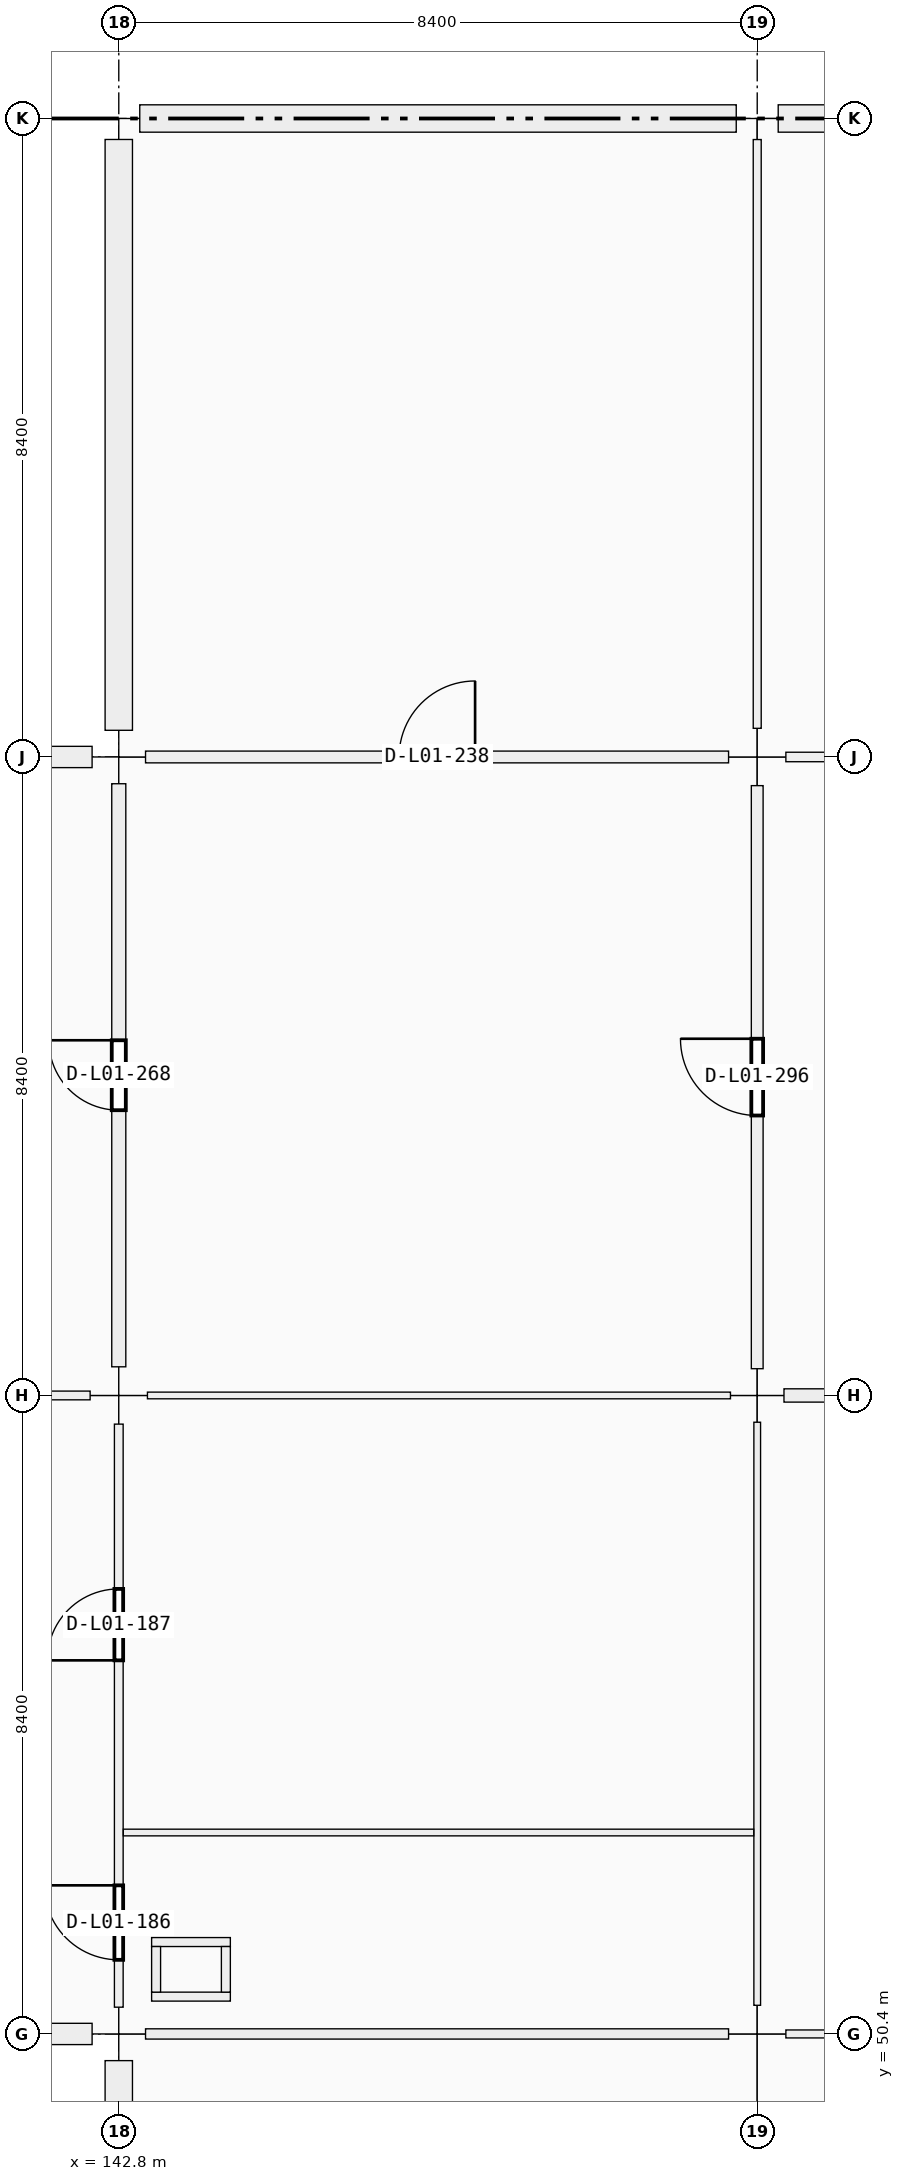
"""IFC4 building model, lengths in metres.
Left out: names, types, materials, properties, quantities, classifications, styles, units other than length and angle.
Written with IfcOpenShell. Run it as: python <this file> out.ifc"""

import sys

from ifc_helpers import new_model, si_unit, direction, frame, frame_2d, origin, origin_2d, place, context, subcontext, project, spatial, rectangle, extrude, element, fill, save


model = new_model("IFC4")
c1 = context("Model", 3, precision=1e-05, world=origin(), true_north=direction((0.0, 1.0)))
c2 = subcontext(c1, "Body", "Model", "MODEL_VIEW")
j1 = project(units=[si_unit("LENGTHUNIT", "METRE"), si_unit("PLANEANGLEUNIT", "RADIAN")], contexts=[c1])
p1 = place(None, origin())
s1 = spatial("IfcSite", under=j1, at=p1, CompositionType="ELEMENT")
p2 = place(p1, origin())
s2 = spatial("IfcBuilding", under=s1, at=p2, CompositionType="ELEMENT")
p3 = place(p2, frame((0.0, 0.0, 5.76)))
s3 = spatial("IfcBuildingStorey", under=s2, at=p3, CompositionType="ELEMENT", Elevation=5.76)
p4 = place(p3, frame((142.8, 50.4, 0.0), z_axis=(0.0, 0.0, 1.0), x_axis=(1.0, 0.0, 0.0)))
e1 = element("IfcColumn", 1, at=p4, inside=s3, PredefinedType="COLUMN", context=c2, shape_type="SweptSolid", body=[
    extrude(rectangle(XDim=0.7, YDim=0.7, at=origin_2d()), origin(), (0.0, 0.0, 1.0), 4.5),
])
p5 = place(p3, frame((142.8, 58.8, 0.0), z_axis=(0.0, 0.0, 1.0), x_axis=(1.0, 0.0, 0.0)))
e2 = element("IfcColumn", 2, at=p5, inside=s3, PredefinedType="COLUMN", context=c2, shape_type="SweptSolid", body=[
    extrude(rectangle(XDim=0.75, YDim=0.75, at=origin_2d()), origin(), (0.0, 0.0, 1.0), 4.5),
])
p6 = place(p3, frame((142.8, 67.2, 0.0), z_axis=(0.0, 0.0, 1.0), x_axis=(1.0, 0.0, 0.0)))
e3 = element("IfcColumn", 3, at=p6, inside=s3, PredefinedType="COLUMN", context=c2, shape_type="SweptSolid", body=[
    extrude(rectangle(XDim=0.7, YDim=0.7, at=origin_2d()), origin(), (0.0, 0.0, 1.0), 4.5),
])
p7 = place(p3, frame((142.8, 75.6, 0.0), z_axis=(0.0, 0.0, 1.0), x_axis=(1.0, 0.0, 0.0)))
e4 = element("IfcColumn", 4, at=p7, inside=s3, PredefinedType="COLUMN", context=c2, shape_type="SweptSolid", body=[
    extrude(rectangle(XDim=0.55, YDim=0.55, at=origin_2d()), origin(), (0.0, 0.0, 1.0), 4.2),
])
p8 = place(p3, frame((151.2, 50.4, 0.0), z_axis=(0.0, 0.0, 1.0), x_axis=(1.0, 0.0, 0.0)))
e5 = element("IfcColumn", 5, at=p8, inside=s3, PredefinedType="COLUMN", context=c2, shape_type="SweptSolid", body=[
    extrude(rectangle(XDim=0.75, YDim=0.75, at=origin_2d()), origin(), (0.0, 0.0, 1.0), 4.5),
])
p9 = place(p3, frame((151.2, 58.8, 0.0), z_axis=(0.0, 0.0, 1.0), x_axis=(1.0, 0.0, 0.0)))
e6 = element("IfcColumn", 6, at=p9, inside=s3, PredefinedType="COLUMN", context=c2, shape_type="SweptSolid", body=[
    extrude(rectangle(XDim=0.7, YDim=0.7, at=origin_2d()), origin(), (0.0, 0.0, 1.0), 4.5),
])
p10 = place(p3, frame((151.2, 67.2, 0.0), z_axis=(0.0, 0.0, 1.0), x_axis=(1.0, 0.0, 0.0)))
e7 = element("IfcColumn", 7, at=p10, inside=s3, PredefinedType="COLUMN", context=c2, shape_type="SweptSolid", body=[
    extrude(rectangle(XDim=0.75, YDim=0.75, at=origin_2d()), origin(), (0.0, 0.0, 1.0), 4.5),
])
p11 = place(p3, frame((151.2, 75.6, 0.0), z_axis=(0.0, 0.0, 1.0), x_axis=(1.0, 0.0, 0.0)))
e8 = element("IfcColumn", 8, at=p11, inside=s3, PredefinedType="COLUMN", context=c2, shape_type="SweptSolid", body=[
    extrude(rectangle(XDim=0.55, YDim=0.55, at=origin_2d()), origin(), (0.0, 0.0, 1.0), 4.2),
])
p12 = place(p3, frame((142.449, 50.4, 0.0), z_axis=(0.0, 0.0, 1.0), x_axis=(-1.0, 0.0, 0.0)))
e9 = element("IfcWall", 9, at=p12, inside=s3, PredefinedType="SOLIDWALL", context=c2, shape_type="SweptSolid", body=[
    extrude(rectangle(XDim=7.673, YDim=0.28, at=frame_2d((3.836, 0.0))), origin(), (0.0, 0.0, 1.0), 3.4),
])
p13 = place(p3, frame((134.726, 67.2, 0.0), z_axis=(0.0, 0.0, 1.0), x_axis=(1.0, 0.0, 0.0)))
e10 = element("IfcWall", 10, at=p13, inside=s3, PredefinedType="SOLIDWALL", context=c2, shape_type="SweptSolid", body=[
    extrude(rectangle(XDim=7.723, YDim=0.28, at=frame_2d((3.861, 0.0))), origin(), (0.0, 0.0, 1.0), 3.4),
])
p14 = place(p13, frame((2.662, 0.0, 0.9)))
e11 = element("IfcOpeningElement", 11, at=p14, cuts=e10, PredefinedType="OPENING", context=c2, shape_type="SweptSolid", body=[
    extrude(rectangle(XDim=2.4, YDim=2.25, at=frame_2d((1.2, 1.125))), frame((0.0, 0.14, 0.0), z_axis=(0.0, -1.0, 0.0), x_axis=(1.0, 0.0, 0.0)), (0.0, 0.0, 1.0), 0.28),
])
p15 = place(p3, frame((142.8, 42.376, 0.0), z_axis=(0.0, 0.0, 1.0), x_axis=(0.0, 1.0, 0.0)))
e12 = element("IfcWall", 12, at=p15, inside=s3, PredefinedType="SOLIDWALL", context=c2, shape_type="SweptSolid", body=[
    extrude(rectangle(XDim=7.673, YDim=0.36, at=frame_2d((3.836, 0.0))), origin(), (0.0, 0.0, 1.0), 3.4),
])
p16 = place(p15, frame((3.386, 0.0, 0.9)))
e13 = element("IfcOpeningElement", 13, at=p16, cuts=e12, PredefinedType="OPENING", context=c2, shape_type="SweptSolid", body=[
    extrude(rectangle(XDim=0.9, YDim=1.5, at=frame_2d((0.45, 0.75))), frame((0.0, 0.18, 0.0), z_axis=(0.0, -1.0, 0.0), x_axis=(1.0, 0.0, 0.0)), (0.0, 0.0, 1.0), 0.36),
])
p17 = place(p3, frame((142.8, 67.551, 0.0), z_axis=(0.0, 0.0, 1.0), x_axis=(0.0, 1.0, 0.0)))
e14 = element("IfcWall", 14, at=p17, inside=s3, PredefinedType="SOLIDWALL", context=c2, shape_type="SweptSolid", body=[
    extrude(rectangle(XDim=7.773, YDim=0.36, at=frame_2d((3.886, 0.0))), origin(), (0.0, 0.0, 1.0), 3.4),
])
p18 = place(p17, frame((3.036, 0.0, 0.9)))
e15 = element("IfcOpeningElement", 15, at=p18, cuts=e14, PredefinedType="OPENING", context=c2, shape_type="SweptSolid", body=[
    extrude(rectangle(XDim=1.7, YDim=1.85, at=frame_2d((0.85, 0.925))), frame((0.0, 0.18, 0.0), z_axis=(0.0, -1.0, 0.0), x_axis=(1.0, 0.0, 0.0)), (0.0, 0.0, 1.0), 0.36),
])
p19 = place(p3, frame((143.076, 75.6, 0.0), z_axis=(0.0, 0.0, 1.0), x_axis=(1.0, 0.0, 0.0)))
e16 = element("IfcWall", 16, at=p19, inside=s3, PredefinedType="SOLIDWALL", context=c2, shape_type="SweptSolid", body=[
    extrude(rectangle(XDim=7.848, YDim=0.36, at=frame_2d((3.924, 0.0))), origin(), (0.0, 0.0, 1.0), 3.4),
])
p20 = place(p19, frame((2.774, 0.0, 0.9)))
e17 = element("IfcOpeningElement", 17, at=p20, cuts=e16, PredefinedType="OPENING", context=c2, shape_type="SweptSolid", body=[
    extrude(rectangle(XDim=2.3, YDim=1.85, at=frame_2d((1.15, 0.925))), frame((0.0, 0.18, 0.0), z_axis=(0.0, -1.0, 0.0), x_axis=(1.0, 0.0, 0.0)), (0.0, 0.0, 1.0), 0.36),
])
p21 = place(p3, frame((151.476, 75.6, 0.0), z_axis=(0.0, 0.0, 1.0), x_axis=(1.0, 0.0, 0.0)))
e18 = element("IfcWall", 18, at=p21, inside=s3, PredefinedType="SOLIDWALL", context=c2, shape_type="SweptSolid", body=[
    extrude(rectangle(XDim=7.848, YDim=0.36, at=frame_2d((3.924, 0.0))), origin(), (0.0, 0.0, 1.0), 3.4),
])
p22 = place(p21, frame((2.474, 0.0, 0.9)))
e19 = element("IfcOpeningElement", 19, at=p22, cuts=e18, PredefinedType="OPENING", context=c2, shape_type="SweptSolid", body=[
    extrude(rectangle(XDim=2.9, YDim=1.85, at=frame_2d((1.45, 0.925))), frame((0.0, 0.18, 0.0), z_axis=(0.0, -1.0, 0.0), x_axis=(1.0, 0.0, 0.0)), (0.0, 0.0, 1.0), 0.36),
])
for number, where, z_axis, x_axis in (
    (20, (143.232, 50.891, 0.0), (0.0, 0.0, 1.0), (1.0, 0.0, 0.0)),
    (21, (143.232, 51.609, 0.0), (0.0, 0.0, 1.0), (1.0, 0.0, 0.0)),
):
    element("IfcWall", number, at=place(p3, frame(where, z_axis=z_axis, x_axis=x_axis)), inside=s3, PredefinedType="PARTITIONING", context=c2, shape_type="SweptSolid", body=[
        extrude(rectangle(XDim=1.036, YDim=0.118, at=frame_2d((0.518, 0.0))), origin(), (0.0, 0.0, 1.0), 3.48),
    ])
for number, where, z_axis, x_axis in (
    (22, (143.291, 50.95, 0.0), (0.0, 0.0, 1.0), (0.0, 1.0, 0.0)),
    (23, (144.209, 50.95, 0.0), (0.0, 0.0, 1.0), (0.0, 1.0, 0.0)),
):
    element("IfcWall", number, at=place(p3, frame(where, z_axis=z_axis, x_axis=x_axis)), inside=s3, PredefinedType="PARTITIONING", context=c2, shape_type="SweptSolid", body=[
        extrude(rectangle(XDim=0.6, YDim=0.118, at=frame_2d((0.3, 0.0))), origin(), (0.0, 0.0, 1.0), 3.48),
    ])
p23 = place(p3, frame((134.752, 58.8, 0.0), z_axis=(0.0, 0.0, 1.0), x_axis=(1.0, 0.0, 0.0)))
e24 = element("IfcWall", 24, at=p23, inside=s3, PredefinedType="PARTITIONING", context=c2, shape_type="SweptSolid", body=[
    extrude(rectangle(XDim=7.671, YDim=0.115, at=frame_2d((3.835, 0.0))), origin(), (0.0, 0.0, 1.0), 2.4),
])
p24 = place(p23, frame((3.356, 0.0, 0.0)))
e25 = element("IfcOpeningElement", 25, at=p24, cuts=e24, PredefinedType="OPENING", context=c2, shape_type="SweptSolid", body=[
    extrude(rectangle(XDim=0.96, YDim=2.18, at=frame_2d((0.48, 1.09))), frame((0.0, 0.058, 0.0), z_axis=(0.0, -1.0, 0.0), x_axis=(1.0, 0.0, 0.0)), (0.0, 0.0, 1.0), 0.115),
])
p25 = place(p3, frame((143.152, 50.4, 0.0), z_axis=(0.0, 0.0, 1.0), x_axis=(1.0, 0.0, 0.0)))
e26 = element("IfcWall", 26, at=p25, inside=s3, PredefinedType="PARTITIONING", context=c2, shape_type="SweptSolid", body=[
    extrude(rectangle(XDim=7.671, YDim=0.135, at=frame_2d((3.835, 0.0))), origin(), (0.0, 0.0, 1.0), 2.4),
])
p26 = place(p3, frame((143.177, 58.8, 0.0), z_axis=(0.0, 0.0, 1.0), x_axis=(1.0, 0.0, 0.0)))
e27 = element("IfcWall", 27, at=p26, inside=s3, PredefinedType="PARTITIONING", context=c2, shape_type="SweptSolid", body=[
    extrude(rectangle(XDim=7.671, YDim=0.088, at=frame_2d((3.835, 0.0))), origin(), (0.0, 0.0, 1.0), 2.4),
])
p27 = place(p3, frame((143.152, 67.2, 0.0), z_axis=(0.0, 0.0, 1.0), x_axis=(1.0, 0.0, 0.0)))
e28 = element("IfcWall", 28, at=p27, inside=s3, PredefinedType="PARTITIONING", context=c2, shape_type="SweptSolid", body=[
    extrude(rectangle(XDim=7.671, YDim=0.155, at=frame_2d((3.835, 0.0))), origin(), (0.0, 0.0, 1.0), 2.4),
])
p28 = place(p27, frame((3.336, 0.0, 0.0)))
e29 = element("IfcOpeningElement", 29, at=p28, cuts=e28, PredefinedType="OPENING", context=c2, shape_type="SweptSolid", body=[
    extrude(rectangle(XDim=1.0, YDim=2.2, at=frame_2d((0.5, 1.1))), frame((0.0, 0.078, 0.0), z_axis=(0.0, -1.0, 0.0), x_axis=(1.0, 0.0, 0.0)), (0.0, 0.0, 1.0), 0.155),
])
p29 = place(p3, frame((151.577, 50.4, 0.0), z_axis=(0.0, 0.0, 1.0), x_axis=(1.0, 0.0, 0.0)))
e30 = element("IfcWall", 30, at=p29, inside=s3, PredefinedType="PARTITIONING", context=c2, shape_type="SweptSolid", body=[
    extrude(rectangle(XDim=7.671, YDim=0.105, at=frame_2d((3.835, 0.0))), origin(), (0.0, 0.0, 1.0), 2.4),
])
p30 = place(p29, frame((3.365, 0.0, 0.0)))
e31 = element("IfcOpeningElement", 31, at=p30, cuts=e30, PredefinedType="OPENING", context=c2, shape_type="SweptSolid", body=[
    extrude(rectangle(XDim=0.94, YDim=2.15, at=frame_2d((0.47, 1.075))), frame((0.0, 0.052, 0.0), z_axis=(0.0, -1.0, 0.0), x_axis=(1.0, 0.0, 0.0)), (0.0, 0.0, 1.0), 0.105),
])
p31 = place(p3, frame((151.552, 58.8, 0.0), z_axis=(0.0, 0.0, 1.0), x_axis=(1.0, 0.0, 0.0)))
e32 = element("IfcWall", 32, at=p31, inside=s3, PredefinedType="PARTITIONING", context=c2, shape_type="SweptSolid", body=[
    extrude(rectangle(XDim=7.671, YDim=0.175, at=frame_2d((3.835, 0.0))), origin(), (0.0, 0.0, 1.0), 2.4),
])
p32 = place(p31, frame((3.376, 0.0, 0.0)))
e33 = element("IfcOpeningElement", 33, at=p32, cuts=e32, PredefinedType="OPENING", context=c2, shape_type="SweptSolid", body=[
    extrude(rectangle(XDim=0.92, YDim=2.15, at=frame_2d((0.46, 1.075))), frame((0.0, 0.087, 0.0), z_axis=(0.0, -1.0, 0.0), x_axis=(1.0, 0.0, 0.0)), (0.0, 0.0, 1.0), 0.175),
])
p33 = place(p3, frame((151.577, 67.2, 0.0), z_axis=(0.0, 0.0, 1.0), x_axis=(1.0, 0.0, 0.0)))
e34 = element("IfcWall", 34, at=p33, inside=s3, PredefinedType="PARTITIONING", context=c2, shape_type="SweptSolid", body=[
    extrude(rectangle(XDim=7.671, YDim=0.125, at=frame_2d((3.835, 0.0))), origin(), (0.0, 0.0, 1.0), 2.4),
])
p34 = place(p33, frame((3.311, 0.0, 0.0)))
e35 = element("IfcOpeningElement", 35, at=p34, cuts=e34, PredefinedType="OPENING", context=c2, shape_type="SweptSolid", body=[
    extrude(rectangle(XDim=1.05, YDim=2.12, at=frame_2d((0.525, 1.06))), frame((0.0, 0.062, 0.0), z_axis=(0.0, -1.0, 0.0), x_axis=(1.0, 0.0, 0.0)), (0.0, 0.0, 1.0), 0.125),
])
p35 = place(p3, frame((142.8, 50.752, 0.0), z_axis=(0.0, 0.0, 1.0), x_axis=(0.0, 1.0, 0.0)))
e36 = element("IfcWall", 36, at=p35, inside=s3, PredefinedType="PARTITIONING", context=c2, shape_type="SweptSolid", body=[
    extrude(rectangle(XDim=7.671, YDim=0.115, at=frame_2d((3.835, 0.0))), origin(), (0.0, 0.0, 1.0), 2.4),
])
p36 = place(p35, frame((0.623, 0.0, 0.0)))
e37 = element("IfcOpeningElement", 37, at=p36, cuts=e36, PredefinedType="OPENING", context=c2, shape_type="SweptSolid", body=[
    extrude(rectangle(XDim=0.98, YDim=2.08, at=frame_2d((0.49, 1.04))), frame((0.0, 0.058, 0.0), z_axis=(0.0, -1.0, 0.0), x_axis=(1.0, 0.0, 0.0)), (0.0, 0.0, 1.0), 0.115),
])
p37 = place(p35, frame((4.563, 0.0, 0.0)))
e38 = element("IfcOpeningElement", 38, at=p37, cuts=e36, PredefinedType="OPENING", context=c2, shape_type="SweptSolid", body=[
    extrude(rectangle(XDim=0.94, YDim=2.08, at=frame_2d((0.47, 1.04))), frame((0.0, 0.058, 0.0), z_axis=(0.0, -1.0, 0.0), x_axis=(1.0, 0.0, 0.0)), (0.0, 0.0, 1.0), 0.115),
])
p38 = place(p3, frame((142.8, 59.177, 0.0), z_axis=(0.0, 0.0, 1.0), x_axis=(0.0, 1.0, 0.0)))
e39 = element("IfcWall", 39, at=p38, inside=s3, PredefinedType="PARTITIONING", context=c2, shape_type="SweptSolid", body=[
    extrude(rectangle(XDim=7.671, YDim=0.185, at=frame_2d((3.835, 0.0))), origin(), (0.0, 0.0, 1.0), 2.4),
])
p39 = place(p38, frame((3.376, 0.0, 0.0)))
e40 = element("IfcOpeningElement", 40, at=p39, cuts=e39, PredefinedType="OPENING", context=c2, shape_type="SweptSolid", body=[
    extrude(rectangle(XDim=0.92, YDim=2.15, at=frame_2d((0.46, 1.075))), frame((0.0, 0.093, 0.0), z_axis=(0.0, -1.0, 0.0), x_axis=(1.0, 0.0, 0.0)), (0.0, 0.0, 1.0), 0.185),
])
p40 = place(p3, frame((151.2, 50.777, 0.0), z_axis=(0.0, 0.0, 1.0), x_axis=(0.0, 1.0, 0.0)))
e41 = element("IfcWall", 41, at=p40, inside=s3, PredefinedType="PARTITIONING", context=c2, shape_type="SweptSolid", body=[
    extrude(rectangle(XDim=7.671, YDim=0.088, at=frame_2d((3.835, 0.0))), origin(), (0.0, 0.0, 1.0), 2.4),
])
p41 = place(p3, frame((151.2, 59.152, 0.0), z_axis=(0.0, 0.0, 1.0), x_axis=(0.0, 1.0, 0.0)))
e42 = element("IfcWall", 42, at=p41, inside=s3, PredefinedType="PARTITIONING", context=c2, shape_type="SweptSolid", body=[
    extrude(rectangle(XDim=7.671, YDim=0.155, at=frame_2d((3.835, 0.0))), origin(), (0.0, 0.0, 1.0), 2.4),
])
p42 = place(p41, frame((3.331, 0.0, 0.0)))
e43 = element("IfcOpeningElement", 43, at=p42, cuts=e42, PredefinedType="OPENING", context=c2, shape_type="SweptSolid", body=[
    extrude(rectangle(XDim=1.01, YDim=2.12, at=frame_2d((0.505, 1.06))), frame((0.0, 0.078, 0.0), z_axis=(0.0, -1.0, 0.0), x_axis=(1.0, 0.0, 0.0)), (0.0, 0.0, 1.0), 0.155),
])
p43 = place(p3, frame((151.2, 67.577, 0.0), z_axis=(0.0, 0.0, 1.0), x_axis=(0.0, 1.0, 0.0)))
e44 = element("IfcWall", 44, at=p43, inside=s3, PredefinedType="PARTITIONING", context=c2, shape_type="SweptSolid", body=[
    extrude(rectangle(XDim=7.746, YDim=0.105, at=frame_2d((3.873, 0.0))), origin(), (0.0, 0.0, 1.0), 2.4),
])
p44 = place(p43, frame((3.388, 0.0, 0.0)))
e45 = element("IfcOpeningElement", 45, at=p44, cuts=e44, PredefinedType="OPENING", context=c2, shape_type="SweptSolid", body=[
    extrude(rectangle(XDim=0.97, YDim=2.12, at=frame_2d((0.485, 1.06))), frame((0.0, 0.052, 0.0), z_axis=(0.0, -1.0, 0.0), x_axis=(1.0, 0.0, 0.0)), (0.0, 0.0, 1.0), 0.105),
])
p45 = place(p3, frame((142.86, 53.05, 0.0), z_axis=(0.0, 0.0, 1.0), x_axis=(1.0, 0.0, 0.0)))
e46 = element("IfcWall", 46, at=p45, inside=s3, PredefinedType="PARTITIONING", context=c2, shape_type="SweptSolid", body=[
    extrude(rectangle(XDim=8.294, YDim=0.088, at=frame_2d((4.147, 0.0))), origin(), (0.0, 0.0, 1.0), 2.4),
])
p46 = place(p18, origin())
e47 = element("IfcWindow", 47, at=p46, inside=s3, PartitioningType="SINGLE_PANEL", PredefinedType="WINDOW", context=c2, shape_type="SweptSolid", body=[
    extrude(rectangle(XDim=1.7, YDim=1.85, at=frame_2d((0.85, 0.925))), frame((0.0, 0.03, 0.0), z_axis=(0.0, -1.0, 0.0), x_axis=(1.0, 0.0, 0.0)), (0.0, 0.0, 1.0), 0.06),
])
fill(e15, e47)
p47 = place(p20, origin())
e48 = element("IfcWindow", 48, at=p47, inside=s3, PartitioningType="SINGLE_PANEL", PredefinedType="WINDOW", context=c2, shape_type="SweptSolid", body=[
    extrude(rectangle(XDim=2.3, YDim=1.85, at=frame_2d((1.15, 0.925))), frame((0.0, 0.03, 0.0), z_axis=(0.0, -1.0, 0.0), x_axis=(1.0, 0.0, 0.0)), (0.0, 0.0, 1.0), 0.06),
])
fill(e17, e48)
p48 = place(p36, origin())
e49 = element("IfcDoor", 49, at=p48, inside=s3, OperationType="SINGLE_SWING_RIGHT", PredefinedType="DOOR", context=c2, shape_type="SweptSolid", body=[
    extrude(rectangle(XDim=0.98, YDim=2.08, at=frame_2d((0.49, 1.04))), frame((0.0, 0.025, 0.0), z_axis=(0.0, -1.0, 0.0), x_axis=(1.0, 0.0, 0.0)), (0.0, 0.0, 1.0), 0.05),
])
fill(e37, e49)
p49 = place(p37, origin())
e50 = element("IfcDoor", 50, at=p49, inside=s3, OperationType="SINGLE_SWING_LEFT", PredefinedType="DOOR", context=c2, shape_type="SweptSolid", body=[
    extrude(rectangle(XDim=0.94, YDim=2.08, at=frame_2d((0.47, 1.04))), frame((0.0, 0.025, 0.0), z_axis=(0.0, -1.0, 0.0), x_axis=(1.0, 0.0, 0.0)), (0.0, 0.0, 1.0), 0.05),
])
fill(e38, e50)
p50 = place(p28, origin())
e51 = element("IfcDoor", 51, at=p50, inside=s3, OperationType="SINGLE_SWING_RIGHT", PredefinedType="DOOR", context=c2, shape_type="SweptSolid", body=[
    extrude(rectangle(XDim=1.0, YDim=2.2, at=frame_2d((0.5, 1.1))), frame((0.0, 0.025, 0.0), z_axis=(0.0, -1.0, 0.0), x_axis=(1.0, 0.0, 0.0)), (0.0, 0.0, 1.0), 0.05),
])
fill(e29, e51)
p51 = place(p39, origin())
e52 = element("IfcDoor", 52, at=p51, inside=s3, OperationType="SINGLE_SWING_RIGHT", PredefinedType="DOOR", context=c2, shape_type="SweptSolid", body=[
    extrude(rectangle(XDim=0.92, YDim=2.15, at=frame_2d((0.46, 1.075))), frame((0.0, 0.025, 0.0), z_axis=(0.0, -1.0, 0.0), x_axis=(1.0, 0.0, 0.0)), (0.0, 0.0, 1.0), 0.05),
])
fill(e40, e52)
p52 = place(p42, origin())
e53 = element("IfcDoor", 53, at=p52, inside=s3, OperationType="SINGLE_SWING_RIGHT", PredefinedType="DOOR", context=c2, shape_type="SweptSolid", body=[
    extrude(rectangle(XDim=1.01, YDim=2.12, at=frame_2d((0.505, 1.06))), frame((0.0, 0.025, 0.0), z_axis=(0.0, -1.0, 0.0), x_axis=(1.0, 0.0, 0.0)), (0.0, 0.0, 1.0), 0.05),
])
fill(e43, e53)
p53 = place(p44, origin())
e54 = element("IfcDoor", 54, at=p53, inside=s3, OperationType="SINGLE_SWING_LEFT", PredefinedType="DOOR", context=c2, shape_type="SweptSolid", body=[
    extrude(rectangle(XDim=0.97, YDim=2.12, at=frame_2d((0.485, 1.06))), frame((0.0, 0.025, 0.0), z_axis=(0.0, -1.0, 0.0), x_axis=(1.0, 0.0, 0.0)), (0.0, 0.0, 1.0), 0.05),
])
fill(e45, e54)
save(model, sys.argv[1])
